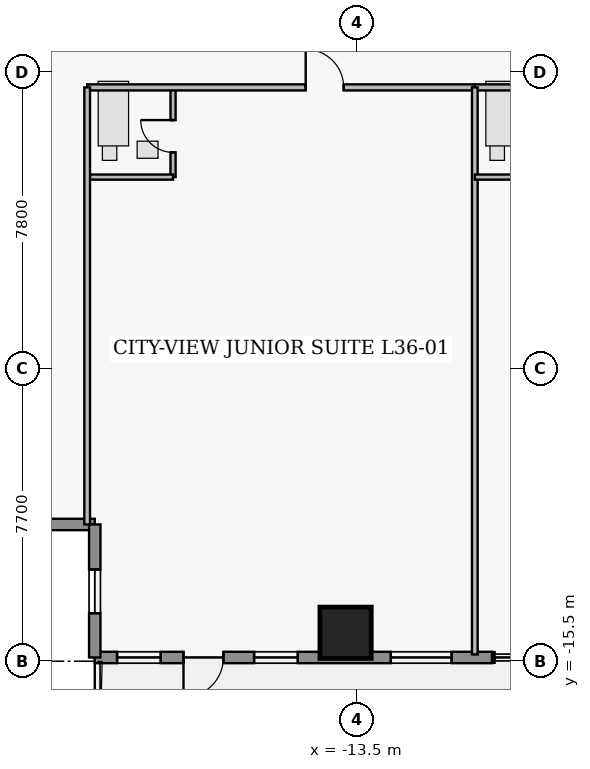
"""IFC4 building model, lengths in metres.
Left out: names, types, materials, properties, quantities, classifications, styles, units other than length and angle.
Written with IfcOpenShell. Run it as: python <this file> out.ifc"""

import sys

from ifc_helpers import new_model, si_unit, direction, frame, frame_2d, origin, origin_2d, place, context, subcontext, project, spatial, rectangle, extrude, element, fill, save


model = new_model("IFC4")
c1 = context("Model", 3, precision=1e-05, world=origin(), true_north=direction((0.0, 1.0)))
c2 = subcontext(c1, "Body", "Model", "MODEL_VIEW")
j1 = project(units=[si_unit("LENGTHUNIT", "METRE"), si_unit("PLANEANGLEUNIT", "RADIAN")], contexts=[c1])
p1 = place(None, origin())
s1 = spatial("IfcSite", under=j1, at=p1, CompositionType="ELEMENT")
p2 = place(p1, origin())
s2 = spatial("IfcBuilding", under=s1, at=p2, CompositionType="ELEMENT")
p3 = place(p2, frame((0.0, 0.0, 143.1)))
s3 = spatial("IfcBuildingStorey", under=s2, at=p3, CompositionType="ELEMENT", Elevation=143.1)
p4 = place(p3, frame((-13.8, -14.75, 0.0), z_axis=(0.0, 0.0, 1.0), x_axis=(1.0, 0.0, 0.0)))
e1 = element("IfcColumn", 1, at=p4, inside=s3, PredefinedType="COLUMN", context=c2, shape_type="SweptSolid", body=[
    extrude(rectangle(XDim=1.35, YDim=1.35, at=origin_2d()), origin(), (0.0, 0.0, 1.0), 3.65),
])
p5 = place(p3, frame((-20.4, -11.9, 0.0), z_axis=(0.0, 0.0, 1.0), x_axis=(-1.0, 0.0, 0.0)))
e2 = element("IfcWall", 2, at=p5, inside=s3, PredefinedType="STANDARD", context=c2, shape_type="SweptSolid", body=[
    extrude(rectangle(XDim=3.5, YDim=0.3, at=frame_2d((1.75, 0.0))), origin(), (0.0, 0.0, 1.0), 3.43),
])
p6 = place(p5, frame((1.285, 0.0, 1.25)))
e3 = element("IfcOpeningElement", 3, at=p6, cuts=e2, PredefinedType="OPENING", context=c2, shape_type="SweptSolid", body=[
    extrude(rectangle(XDim=1.15, YDim=1.55, at=frame_2d((0.575, 0.775))), frame((0.0, 0.16, 0.0), z_axis=(0.0, -1.0, 0.0), x_axis=(1.0, 0.0, 0.0)), (0.0, 0.0, 1.0), 0.32),
])
p7 = place(p3, frame((-9.95, -15.4, 0.0), z_axis=(0.0, 0.0, 1.0), x_axis=(-1.0, 0.0, 0.0)))
e4 = element("IfcWall", 4, at=p7, inside=s3, PredefinedType="STANDARD", context=c2, shape_type="SweptSolid", body=[
    extrude(rectangle(XDim=10.45, YDim=0.3, at=frame_2d((5.225, 0.0))), origin(), (0.0, 0.0, 1.0), 3.43),
])
p8 = place(p7, frame((7.065, 0.0, 0.0)))
e5 = element("IfcOpeningElement", 5, at=p8, cuts=e4, PredefinedType="OPENING", context=c2, shape_type="SweptSolid", body=[
    extrude(rectangle(XDim=1.05, YDim=2.2, at=frame_2d((0.525, 1.1))), frame((0.0, 0.16, 0.0), z_axis=(0.0, -1.0, 0.0), x_axis=(1.0, 0.0, 0.0)), (0.0, 0.0, 1.0), 0.32),
])
p9 = place(p7, frame((1.06, 0.0, 0.85)))
e6 = element("IfcOpeningElement", 6, at=p9, cuts=e4, PredefinedType="OPENING", context=c2, shape_type="SweptSolid", body=[
    extrude(rectangle(XDim=1.6, YDim=1.8, at=frame_2d((0.8, 0.9))), frame((0.0, 0.16, 0.0), z_axis=(0.0, -1.0, 0.0), x_axis=(1.0, 0.0, 0.0)), (0.0, 0.0, 1.0), 0.32),
])
p10 = place(p7, frame((5.107, 0.0, 0.95)))
e7 = element("IfcOpeningElement", 7, at=p10, cuts=e4, PredefinedType="OPENING", context=c2, shape_type="SweptSolid", body=[
    extrude(rectangle(XDim=1.15, YDim=1.55, at=frame_2d((0.575, 0.775))), frame((0.0, 0.16, 0.0), z_axis=(0.0, -1.0, 0.0), x_axis=(1.0, 0.0, 0.0)), (0.0, 0.0, 1.0), 0.32),
])
p11 = place(p7, frame((8.712, 0.0, 0.95)))
e8 = element("IfcOpeningElement", 8, at=p11, cuts=e4, PredefinedType="OPENING", context=c2, shape_type="SweptSolid", body=[
    extrude(rectangle(XDim=1.15, YDim=1.55, at=frame_2d((0.575, 0.775))), frame((0.0, 0.16, 0.0), z_axis=(0.0, -1.0, 0.0), x_axis=(1.0, 0.0, 0.0)), (0.0, 0.0, 1.0), 0.32),
])
p12 = place(p3, frame((-20.4, -15.4, 0.0), z_axis=(0.0, 0.0, 1.0), x_axis=(0.0, 1.0, 0.0)))
e9 = element("IfcWall", 9, at=p12, inside=s3, PredefinedType="STANDARD", context=c2, shape_type="SweptSolid", body=[
    extrude(rectangle(XDim=3.5, YDim=0.3, at=frame_2d((1.75, 0.0))), origin(), (0.0, 0.0, 1.0), 3.43),
])
p13 = place(p12, frame((1.165, 0.0, 1.25)))
e10 = element("IfcOpeningElement", 10, at=p13, cuts=e9, PredefinedType="OPENING", context=c2, shape_type="SweptSolid", body=[
    extrude(rectangle(XDim=1.15, YDim=1.55, at=frame_2d((0.575, 0.775))), frame((0.0, 0.16, 0.0), z_axis=(0.0, -1.0, 0.0), x_axis=(1.0, 0.0, 0.0)), (0.0, 0.0, 1.0), 0.32),
])
p14 = place(p3, frame((-18.34, -2.76, 0.0), z_axis=(0.0, 0.0, 1.0), x_axis=(0.0, 1.0, 0.0)))
e11 = element("IfcWall", 11, at=p14, inside=s3, PredefinedType="PLUMBINGWALL", context=c2, shape_type="SweptSolid", body=[
    extrude(rectangle(XDim=2.36, YDim=0.135, at=frame_2d((1.18, 0.0))), origin(), (0.0, 0.0, 1.0), 3.43),
])
p15 = place(p14, frame((0.65, 0.0, 0.0)))
e12 = element("IfcOpeningElement", 12, at=p15, cuts=e11, PredefinedType="OPENING", context=c2, shape_type="SweptSolid", body=[
    extrude(rectangle(XDim=0.85, YDim=2.1, at=frame_2d((0.425, 1.05))), frame((0.0, 0.077, 0.0), z_axis=(0.0, -1.0, 0.0), x_axis=(1.0, 0.0, 0.0)), (0.0, 0.0, 1.0), 0.155),
])
p16 = place(p3, frame((-20.6, -0.4, 0.0), z_axis=(0.0, 0.0, 1.0), x_axis=(1.0, 0.0, 0.0)))
e13 = element("IfcWall", 13, at=p16, inside=s3, PredefinedType="PARTITIONING", context=c2, shape_type="SweptSolid", body=[
    extrude(rectangle(XDim=10.2, YDim=0.16, at=frame_2d((5.1, 0.0))), origin(), (0.0, 0.0, 1.0), 3.43),
])
p17 = place(p16, frame((5.75, 0.0, 0.0)))
e14 = element("IfcOpeningElement", 14, at=p17, cuts=e13, PredefinedType="OPENING", context=c2, shape_type="SweptSolid", body=[
    extrude(rectangle(XDim=1.0, YDim=2.15, at=frame_2d((0.5, 1.075))), frame((0.0, 0.09, 0.0), z_axis=(0.0, -1.0, 0.0), x_axis=(1.0, 0.0, 0.0)), (0.0, 0.0, 1.0), 0.18),
])
p18 = place(p3, frame((-10.4, -0.4, 0.0), z_axis=(0.0, 0.0, 1.0), x_axis=(1.0, 0.0, 0.0)))
e15 = element("IfcWall", 15, at=p18, inside=s3, PredefinedType="PARTITIONING", context=c2, shape_type="SweptSolid", body=[
    extrude(rectangle(XDim=9.6, YDim=0.16, at=frame_2d((4.8, 0.0))), origin(), (0.0, 0.0, 1.0), 3.43),
])
p19 = place(p18, frame((5.45, 0.0, 0.0)))
e16 = element("IfcOpeningElement", 16, at=p19, cuts=e15, PredefinedType="OPENING", context=c2, shape_type="SweptSolid", body=[
    extrude(rectangle(XDim=1.0, YDim=2.15, at=frame_2d((0.5, 1.075))), frame((0.0, 0.09, 0.0), z_axis=(0.0, -1.0, 0.0), x_axis=(1.0, 0.0, 0.0)), (0.0, 0.0, 1.0), 0.18),
])
p20 = place(p3, frame((-20.6, -2.76, 0.0), z_axis=(0.0, 0.0, 1.0), x_axis=(1.0, 0.0, 0.0)))
e17 = element("IfcWall", 17, at=p20, inside=s3, PredefinedType="PLUMBINGWALL", context=c2, shape_type="SweptSolid", body=[
    extrude(rectangle(XDim=2.26, YDim=0.135, at=frame_2d((1.13, 0.0))), origin(), (0.0, 0.0, 1.0), 3.43),
])
p21 = place(p3, frame((-20.6, -11.9, 0.0), z_axis=(0.0, 0.0, 1.0), x_axis=(0.0, 1.0, 0.0)))
e18 = element("IfcWall", 18, at=p21, inside=s3, PredefinedType="PARTITIONING", context=c2, shape_type="SweptSolid", body=[
    extrude(rectangle(XDim=11.5, YDim=0.15, at=frame_2d((5.75, 0.0))), origin(), (0.0, 0.0, 1.0), 3.43),
])
p22 = place(p3, frame((-10.4, -15.32, 0.0), z_axis=(0.0, 0.0, 1.0), x_axis=(0.0, 1.0, 0.0)))
e19 = element("IfcWall", 19, at=p22, inside=s3, PredefinedType="PARTITIONING", context=c2, shape_type="SweptSolid", body=[
    extrude(rectangle(XDim=14.92, YDim=0.15, at=frame_2d((7.46, 0.0))), origin(), (0.0, 0.0, 1.0), 3.43),
])
p23 = place(p3, frame((-10.4, -2.76, 0.0), z_axis=(0.0, 0.0, 1.0), x_axis=(1.0, 0.0, 0.0)))
e20 = element("IfcWall", 20, at=p23, inside=s3, PredefinedType="PLUMBINGWALL", context=c2, shape_type="SweptSolid", body=[
    extrude(rectangle(XDim=2.26, YDim=0.135, at=frame_2d((1.13, 0.0))), origin(), (0.0, 0.0, 1.0), 3.43),
])
p24 = place(p8, origin())
e21 = element("IfcDoor", 21, at=p24, inside=s3, OperationType="SINGLE_SWING_RIGHT", PredefinedType="DOOR", context=c2, shape_type="SweptSolid", body=[
    extrude(rectangle(XDim=1.05, YDim=2.2, at=frame_2d((0.525, 1.1))), frame((0.0, 0.025, 0.0), z_axis=(0.0, -1.0, 0.0), x_axis=(1.0, 0.0, 0.0)), (0.0, 0.0, 1.0), 0.05),
])
fill(e5, e21)
p25 = place(p9, origin())
e22 = element("IfcWindow", 22, at=p25, inside=s3, PartitioningType="SINGLE_PANEL", PredefinedType="WINDOW", context=c2, shape_type="SweptSolid", body=[
    extrude(rectangle(XDim=1.6, YDim=1.8, at=frame_2d((0.8, 0.9))), frame((0.0, 0.03, 0.0), z_axis=(0.0, -1.0, 0.0), x_axis=(1.0, 0.0, 0.0)), (0.0, 0.0, 1.0), 0.06),
])
fill(e6, e22)
p26 = place(p10, origin())
e23 = element("IfcWindow", 23, at=p26, inside=s3, PartitioningType="SINGLE_PANEL", PredefinedType="WINDOW", context=c2, shape_type="SweptSolid", body=[
    extrude(rectangle(XDim=1.15, YDim=1.55, at=frame_2d((0.575, 0.775))), frame((0.0, 0.03, 0.0), z_axis=(0.0, -1.0, 0.0), x_axis=(1.0, 0.0, 0.0)), (0.0, 0.0, 1.0), 0.06),
])
fill(e7, e23)
p27 = place(p11, origin())
e24 = element("IfcWindow", 24, at=p27, inside=s3, PartitioningType="SINGLE_PANEL", PredefinedType="WINDOW", context=c2, shape_type="SweptSolid", body=[
    extrude(rectangle(XDim=1.15, YDim=1.55, at=frame_2d((0.575, 0.775))), frame((0.0, 0.03, 0.0), z_axis=(0.0, -1.0, 0.0), x_axis=(1.0, 0.0, 0.0)), (0.0, 0.0, 1.0), 0.06),
])
fill(e8, e24)
p28 = place(p13, origin())
e25 = element("IfcWindow", 25, at=p28, inside=s3, PartitioningType="SINGLE_PANEL", PredefinedType="WINDOW", context=c2, shape_type="SweptSolid", body=[
    extrude(rectangle(XDim=1.15, YDim=1.55, at=frame_2d((0.575, 0.775))), frame((0.0, 0.03, 0.0), z_axis=(0.0, -1.0, 0.0), x_axis=(1.0, 0.0, 0.0)), (0.0, 0.0, 1.0), 0.06),
])
fill(e10, e25)
p29 = place(p15, origin())
e26 = element("IfcDoor", 26, at=p29, inside=s3, OperationType="SINGLE_SWING_RIGHT", PredefinedType="DOOR", context=c2, shape_type="SweptSolid", body=[
    extrude(rectangle(XDim=0.85, YDim=2.1, at=frame_2d((0.425, 1.05))), frame((0.0, 0.025, 0.0), z_axis=(0.0, -1.0, 0.0), x_axis=(1.0, 0.0, 0.0)), (0.0, 0.0, 1.0), 0.05),
])
fill(e12, e26)
p30 = place(p17, origin())
e27 = element("IfcDoor", 27, at=p30, inside=s3, OperationType="SINGLE_SWING_LEFT", PredefinedType="DOOR", context=c2, shape_type="SweptSolid", body=[
    extrude(rectangle(XDim=1.0, YDim=2.15, at=frame_2d((0.5, 1.075))), frame((0.0, 0.025, 0.0), z_axis=(0.0, -1.0, 0.0), x_axis=(1.0, 0.0, 0.0)), (0.0, 0.0, 1.0), 0.05),
])
fill(e14, e27)
save(model, sys.argv[1])
